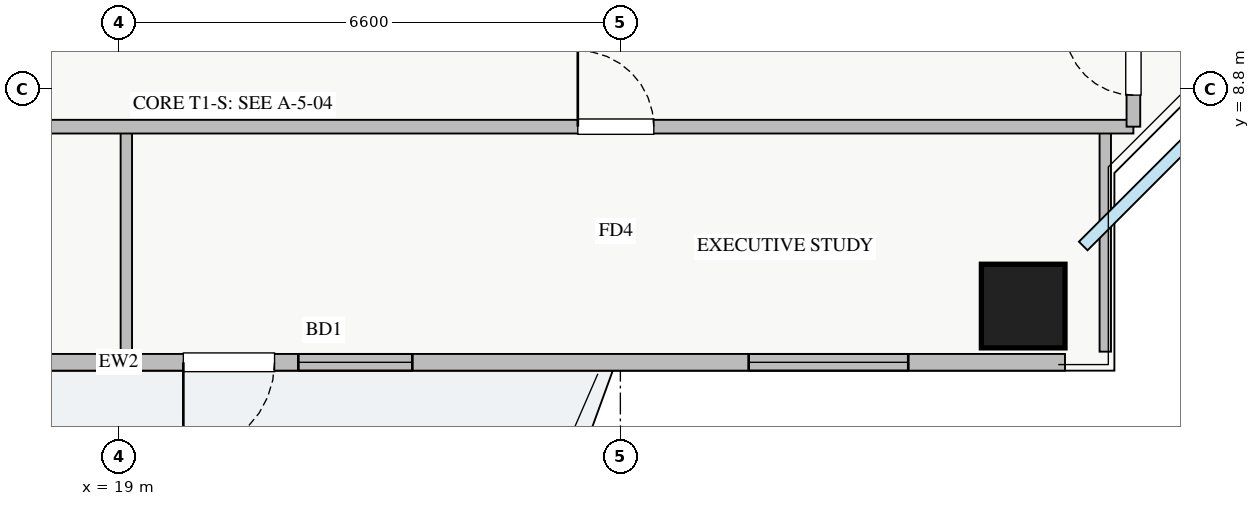
"""IFC4 building model, lengths in metres.
Left out: names, types, materials, properties, quantities, classifications, styles, units other than length and angle.
Written with IfcOpenShell. Run it as: python <this file> out.ifc"""

import sys

from ifc_helpers import new_model, si_unit, direction, frame, frame_2d, origin, origin_2d, place, context, subcontext, project, spatial, rectangle, extrude, source, transform, mapped, element, fill, save


model = new_model("IFC4")
c1 = context("Model", 3, precision=1e-05, world=origin(), true_north=direction((0.0, 1.0)))
c2 = subcontext(c1, "Body", "Model", "MODEL_VIEW")
j1 = project(units=[si_unit("LENGTHUNIT", "METRE"), si_unit("PLANEANGLEUNIT", "RADIAN")], contexts=[c1])
p1 = place(None, origin())
s1 = spatial("IfcSite", under=j1, at=p1, CompositionType="ELEMENT")
p2 = place(p1, origin())
s2 = spatial("IfcBuilding", under=s1, at=p2, CompositionType="ELEMENT")
p3 = place(p2, frame((0.0, 0.0, 123.0)))
s3 = spatial("IfcBuildingStorey", under=s2, at=p3, CompositionType="ELEMENT", Elevation=123.0)
m1 = source(origin(), c2, "Body", "SweptSolid", [
    extrude(rectangle(XDim=1.1, YDim=1.1, at=origin_2d()), origin(), (0.0, 0.0, 1.0), 3.25),
])
p4 = place(p3, frame((30.9, 5.95, 0.0), z_axis=(0.0, 0.0, 1.0), x_axis=(1.0, 0.0, 0.0)))
e1 = element("IfcColumn", 1, at=p4, inside=s3, PredefinedType="COLUMN", context=c2, shape_type="MappedRepresentation", body=[
    mapped(m1, transform((0.0, 0.0, 0.0), x_axis=(1.0, 0.0, 0.0), y_axis=(0.0, 1.0, 0.0), z_axis=(0.0, 0.0, 1.0), scale=1.0)),
])
p5 = place(p3, frame((6.55, 5.21, 0.0), z_axis=(0.0, 0.0, 1.0), x_axis=(1.0, 0.0, 0.0)))
e2 = element("IfcWall", 2, at=p5, inside=s3, PredefinedType="STANDARD", context=c2, shape_type="SweptSolid", body=[
    extrude(rectangle(XDim=24.9, YDim=0.22, at=frame_2d((12.45, 0.0))), origin(), (0.0, 0.0, 1.0), 2.61),
])
p6 = place(p5, frame((13.3, 0.0, 0.0)))
e3 = element("IfcOpeningElement", 3, at=p6, cuts=e2, PredefinedType="OPENING", context=c2, shape_type="SweptSolid", body=[
    extrude(rectangle(XDim=1.2, YDim=2.1, at=frame_2d((0.6, 1.05))), frame((0.0, 0.12, 0.0), z_axis=(0.0, -1.0, 0.0), x_axis=(1.0, 0.0, 0.0)), (0.0, 0.0, 1.0), 0.24),
])
p7 = place(p5, frame((0.343, 0.0, 0.9)))
e4 = element("IfcOpeningElement", 4, at=p7, cuts=e2, PredefinedType="OPENING", context=c2, shape_type="SweptSolid", body=[
    extrude(rectangle(XDim=1.5, YDim=1.5, at=frame_2d((0.75, 0.75))), frame((0.0, 0.12, 0.0), z_axis=(0.0, -1.0, 0.0), x_axis=(1.0, 0.0, 0.0)), (0.0, 0.0, 1.0), 0.24),
])
p8 = place(p5, frame((8.438, 0.0, 0.9)))
e5 = element("IfcOpeningElement", 5, at=p8, cuts=e2, PredefinedType="OPENING", context=c2, shape_type="SweptSolid", body=[
    extrude(rectangle(XDim=1.8, YDim=1.45, at=frame_2d((0.9, 0.725))), frame((0.0, 0.12, 0.0), z_axis=(0.0, -1.0, 0.0), x_axis=(1.0, 0.0, 0.0)), (0.0, 0.0, 1.0), 0.24),
])
p9 = place(p5, frame((14.813, 0.0, 0.9)))
e6 = element("IfcOpeningElement", 6, at=p9, cuts=e2, PredefinedType="OPENING", context=c2, shape_type="SweptSolid", body=[
    extrude(rectangle(XDim=1.5, YDim=1.45, at=frame_2d((0.75, 0.725))), frame((0.0, 0.12, 0.0), z_axis=(0.0, -1.0, 0.0), x_axis=(1.0, 0.0, 0.0)), (0.0, 0.0, 1.0), 0.24),
])
p10 = place(p5, frame((20.738, 0.0, 0.9)))
e7 = element("IfcOpeningElement", 7, at=p10, cuts=e2, PredefinedType="OPENING", context=c2, shape_type="SweptSolid", body=[
    extrude(rectangle(XDim=2.1, YDim=1.48, at=frame_2d((1.05, 0.74))), frame((0.0, 0.12, 0.0), z_axis=(0.0, -1.0, 0.0), x_axis=(1.0, 0.0, 0.0)), (0.0, 0.0, 1.0), 0.24),
])
p11 = place(p5, frame((4.122, 0.0, 0.9)))
e8 = element("IfcOpeningElement", 8, at=p11, cuts=e2, PredefinedType="OPENING", context=c2, shape_type="SweptSolid", body=[
    extrude(rectangle(XDim=2.4, YDim=1.5, at=frame_2d((1.2, 0.75))), frame((0.0, 0.12, 0.0), z_axis=(0.0, -1.0, 0.0), x_axis=(1.0, 0.0, 0.0)), (0.0, 0.0, 1.0), 0.24),
])
p12 = place(p3, frame((19.1, 5.35, 0.0), z_axis=(0.0, 0.0, 1.0), x_axis=(0.0, 1.0, 0.0)))
e9 = element("IfcWall", 9, at=p12, inside=s3, PredefinedType="PARTITIONING", context=c2, shape_type="SweptSolid", body=[
    extrude(rectangle(XDim=2.96, YDim=0.15, at=frame_2d((1.48, 0.0))), origin(), (0.0, 0.0, 1.0), 2.865),
])
p13 = place(p3, frame((31.98, 5.35, 0.0), z_axis=(0.0, 0.0, 1.0), x_axis=(0.0, 1.0, 0.0)))
e10 = element("IfcWall", 10, at=p13, inside=s3, PredefinedType="PARTITIONING", context=c2, shape_type="SweptSolid", body=[
    extrude(rectangle(XDim=2.96, YDim=0.15, at=frame_2d((1.48, 0.0))), origin(), (0.0, 0.0, 1.0), 3.07),
])
p14 = place(p3, frame((8.72, 8.31, 0.0), z_axis=(0.0, 0.0, 1.0), x_axis=(1.0, 0.0, 0.0)))
e11 = element("IfcWall", 11, at=p14, inside=s3, PredefinedType="PARTITIONING", context=c2, shape_type="SweptSolid", body=[
    extrude(rectangle(XDim=23.63, YDim=0.18, at=frame_2d((11.815, 0.0))), origin(), (0.0, 0.0, 1.0), 3.07),
])
p15 = place(p14, frame((4.69, 0.0, 0.0)))
e12 = element("IfcOpeningElement", 12, at=p15, cuts=e11, PredefinedType="OPENING", context=c2, shape_type="SweptSolid", body=[
    extrude(rectangle(XDim=1.0, YDim=2.05, at=frame_2d((0.5, 1.025))), frame((0.0, 0.1, 0.0), z_axis=(0.0, -1.0, 0.0), x_axis=(1.0, 0.0, 0.0)), (0.0, 0.0, 1.0), 0.2),
])
p16 = place(p14, frame((16.32, 0.0, 0.0)))
e13 = element("IfcOpeningElement", 13, at=p16, cuts=e11, PredefinedType="OPENING", context=c2, shape_type="SweptSolid", body=[
    extrude(rectangle(XDim=1.0, YDim=2.05, at=frame_2d((0.5, 1.025))), frame((0.0, 0.1, 0.0), z_axis=(0.0, -1.0, 0.0), x_axis=(1.0, 0.0, 0.0)), (0.0, 0.0, 1.0), 0.2),
])
p17 = place(p3, frame((32.35, 8.31, 0.0), z_axis=(0.0, 0.0, 1.0), x_axis=(0.0, 1.0, 0.0)))
e14 = element("IfcWall", 14, at=p17, inside=s3, PredefinedType="PARTITIONING", context=c2, shape_type="SweptSolid", body=[
    extrude(rectangle(XDim=29.37, YDim=0.18, at=frame_2d((14.685, 0.0))), origin(), (0.0, 0.0, 1.0), 3.07),
])
p18 = place(p17, frame((28.06, 0.0, 0.0)))
e15 = element("IfcOpeningElement", 15, at=p18, cuts=e14, PredefinedType="OPENING", context=c2, shape_type="SweptSolid", body=[
    extrude(rectangle(XDim=0.9, YDim=2.05, at=frame_2d((0.45, 1.025))), frame((0.0, 0.1, 0.0), z_axis=(0.0, -1.0, 0.0), x_axis=(1.0, 0.0, 0.0)), (0.0, 0.0, 1.0), 0.2),
])
p19 = place(p17, frame((0.415, 0.0, 0.0)))
e16 = element("IfcOpeningElement", 16, at=p19, cuts=e14, PredefinedType="OPENING", context=c2, shape_type="SweptSolid", body=[
    extrude(rectangle(XDim=0.9, YDim=2.05, at=frame_2d((0.45, 1.025))), frame((0.0, 0.1, 0.0), z_axis=(0.0, -1.0, 0.0), x_axis=(1.0, 0.0, 0.0)), (0.0, 0.0, 1.0), 0.2),
])
p20 = place(p17, frame((5.295, 0.0, 0.0)))
e17 = element("IfcOpeningElement", 17, at=p20, cuts=e14, PredefinedType="OPENING", context=c2, shape_type="SweptSolid", body=[
    extrude(rectangle(XDim=1.0, YDim=2.05, at=frame_2d((0.5, 1.025))), frame((0.0, 0.1, 0.0), z_axis=(0.0, -1.0, 0.0), x_axis=(1.0, 0.0, 0.0)), (0.0, 0.0, 1.0), 0.2),
])
p21 = place(p17, frame((11.645, 0.0, 0.0)))
e18 = element("IfcOpeningElement", 18, at=p21, cuts=e14, PredefinedType="OPENING", context=c2, shape_type="SweptSolid", body=[
    extrude(rectangle(XDim=1.0, YDim=2.05, at=frame_2d((0.5, 1.025))), frame((0.0, 0.1, 0.0), z_axis=(0.0, -1.0, 0.0), x_axis=(1.0, 0.0, 0.0)), (0.0, 0.0, 1.0), 0.2),
])
p22 = place(p17, frame((20.835, 0.0, 0.0)))
e19 = element("IfcOpeningElement", 19, at=p22, cuts=e14, PredefinedType="OPENING", context=c2, shape_type="SweptSolid", body=[
    extrude(rectangle(XDim=1.0, YDim=2.05, at=frame_2d((0.5, 1.025))), frame((0.0, 0.1, 0.0), z_axis=(0.0, -1.0, 0.0), x_axis=(1.0, 0.0, 0.0)), (0.0, 0.0, 1.0), 0.2),
])
m2 = source(origin(), c2, "Body", "SweptSolid", [
    extrude(rectangle(XDim=1.2, YDim=2.1, at=frame_2d((0.6, 1.05))), frame((0.0, 0.025, 0.0), z_axis=(0.0, -1.0, 0.0), x_axis=(1.0, 0.0, 0.0)), (0.0, 0.0, 1.0), 0.05),
])
p23 = place(p6, frame((1.2, 0.0, 0.0), z_axis=(0.0, 0.0, 1.0), x_axis=(-1.0, 0.0, 0.0)))
e20 = element("IfcDoor", 20, at=p23, inside=s3, OperationType="SINGLE_SWING_LEFT", PredefinedType="DOOR", context=c2, shape_type="MappedRepresentation", body=[
    mapped(m2, transform((0.0, 0.0, 0.0), x_axis=(1.0, 0.0, 0.0), y_axis=(0.0, 1.0, 0.0), z_axis=(0.0, 0.0, 1.0), scale=1.0)),
])
fill(e3, e20)
m3 = source(origin(), c2, "Body", "SweptSolid", [
    extrude(rectangle(XDim=1.5, YDim=1.45, at=frame_2d((0.75, 0.725))), frame((0.0, 0.03, 0.0), z_axis=(0.0, -1.0, 0.0), x_axis=(1.0, 0.0, 0.0)), (0.0, 0.0, 1.0), 0.06),
])
p24 = place(p9, origin())
e21 = element("IfcWindow", 21, at=p24, inside=s3, PartitioningType="DOUBLE_PANEL_VERTICAL", PredefinedType="WINDOW", context=c2, shape_type="MappedRepresentation", body=[
    mapped(m3, transform((0.0, 0.0, 0.0), x_axis=(1.0, 0.0, 0.0), y_axis=(0.0, 1.0, 0.0), z_axis=(0.0, 0.0, 1.0), scale=1.0)),
])
fill(e6, e21)
m4 = source(origin(), c2, "Body", "SweptSolid", [
    extrude(rectangle(XDim=2.1, YDim=1.48, at=frame_2d((1.05, 0.74))), frame((0.0, 0.03, 0.0), z_axis=(0.0, -1.0, 0.0), x_axis=(1.0, 0.0, 0.0)), (0.0, 0.0, 1.0), 0.06),
])
p25 = place(p10, origin())
e22 = element("IfcWindow", 22, at=p25, inside=s3, PartitioningType="TRIPLE_PANEL_VERTICAL", PredefinedType="WINDOW", context=c2, shape_type="MappedRepresentation", body=[
    mapped(m4, transform((0.0, 0.0, 0.0), x_axis=(1.0, 0.0, 0.0), y_axis=(0.0, 1.0, 0.0), z_axis=(0.0, 0.0, 1.0), scale=1.0)),
])
fill(e7, e22)
m5 = source(origin(), c2, "Body", "SweptSolid", [
    extrude(rectangle(XDim=1.0, YDim=2.05, at=frame_2d((0.5, 1.025))), frame((0.0, 0.025, 0.0), z_axis=(0.0, -1.0, 0.0), x_axis=(1.0, 0.0, 0.0)), (0.0, 0.0, 1.0), 0.05),
])
p26 = place(p16, origin())
e23 = element("IfcDoor", 23, at=p26, inside=s3, OperationType="SINGLE_SWING_LEFT", PredefinedType="DOOR", context=c2, shape_type="MappedRepresentation", body=[
    mapped(m5, transform((0.0, 0.0, 0.0), x_axis=(1.0, 0.0, 0.0), y_axis=(0.0, 1.0, 0.0), z_axis=(0.0, 0.0, 1.0), scale=1.0)),
])
fill(e13, e23)
m6 = source(origin(), c2, "Body", "SweptSolid", [
    extrude(rectangle(XDim=0.9, YDim=2.05, at=frame_2d((0.45, 1.025))), frame((0.0, 0.025, 0.0), z_axis=(0.0, -1.0, 0.0), x_axis=(1.0, 0.0, 0.0)), (0.0, 0.0, 1.0), 0.05),
])
p27 = place(p19, origin())
e24 = element("IfcDoor", 24, at=p27, inside=s3, OperationType="SINGLE_SWING_RIGHT", PredefinedType="DOOR", context=c2, shape_type="MappedRepresentation", body=[
    mapped(m6, transform((0.0, 0.0, 0.0), x_axis=(1.0, 0.0, 0.0), y_axis=(0.0, 1.0, 0.0), z_axis=(0.0, 0.0, 1.0), scale=1.0)),
])
fill(e16, e24)
save(model, sys.argv[1])
